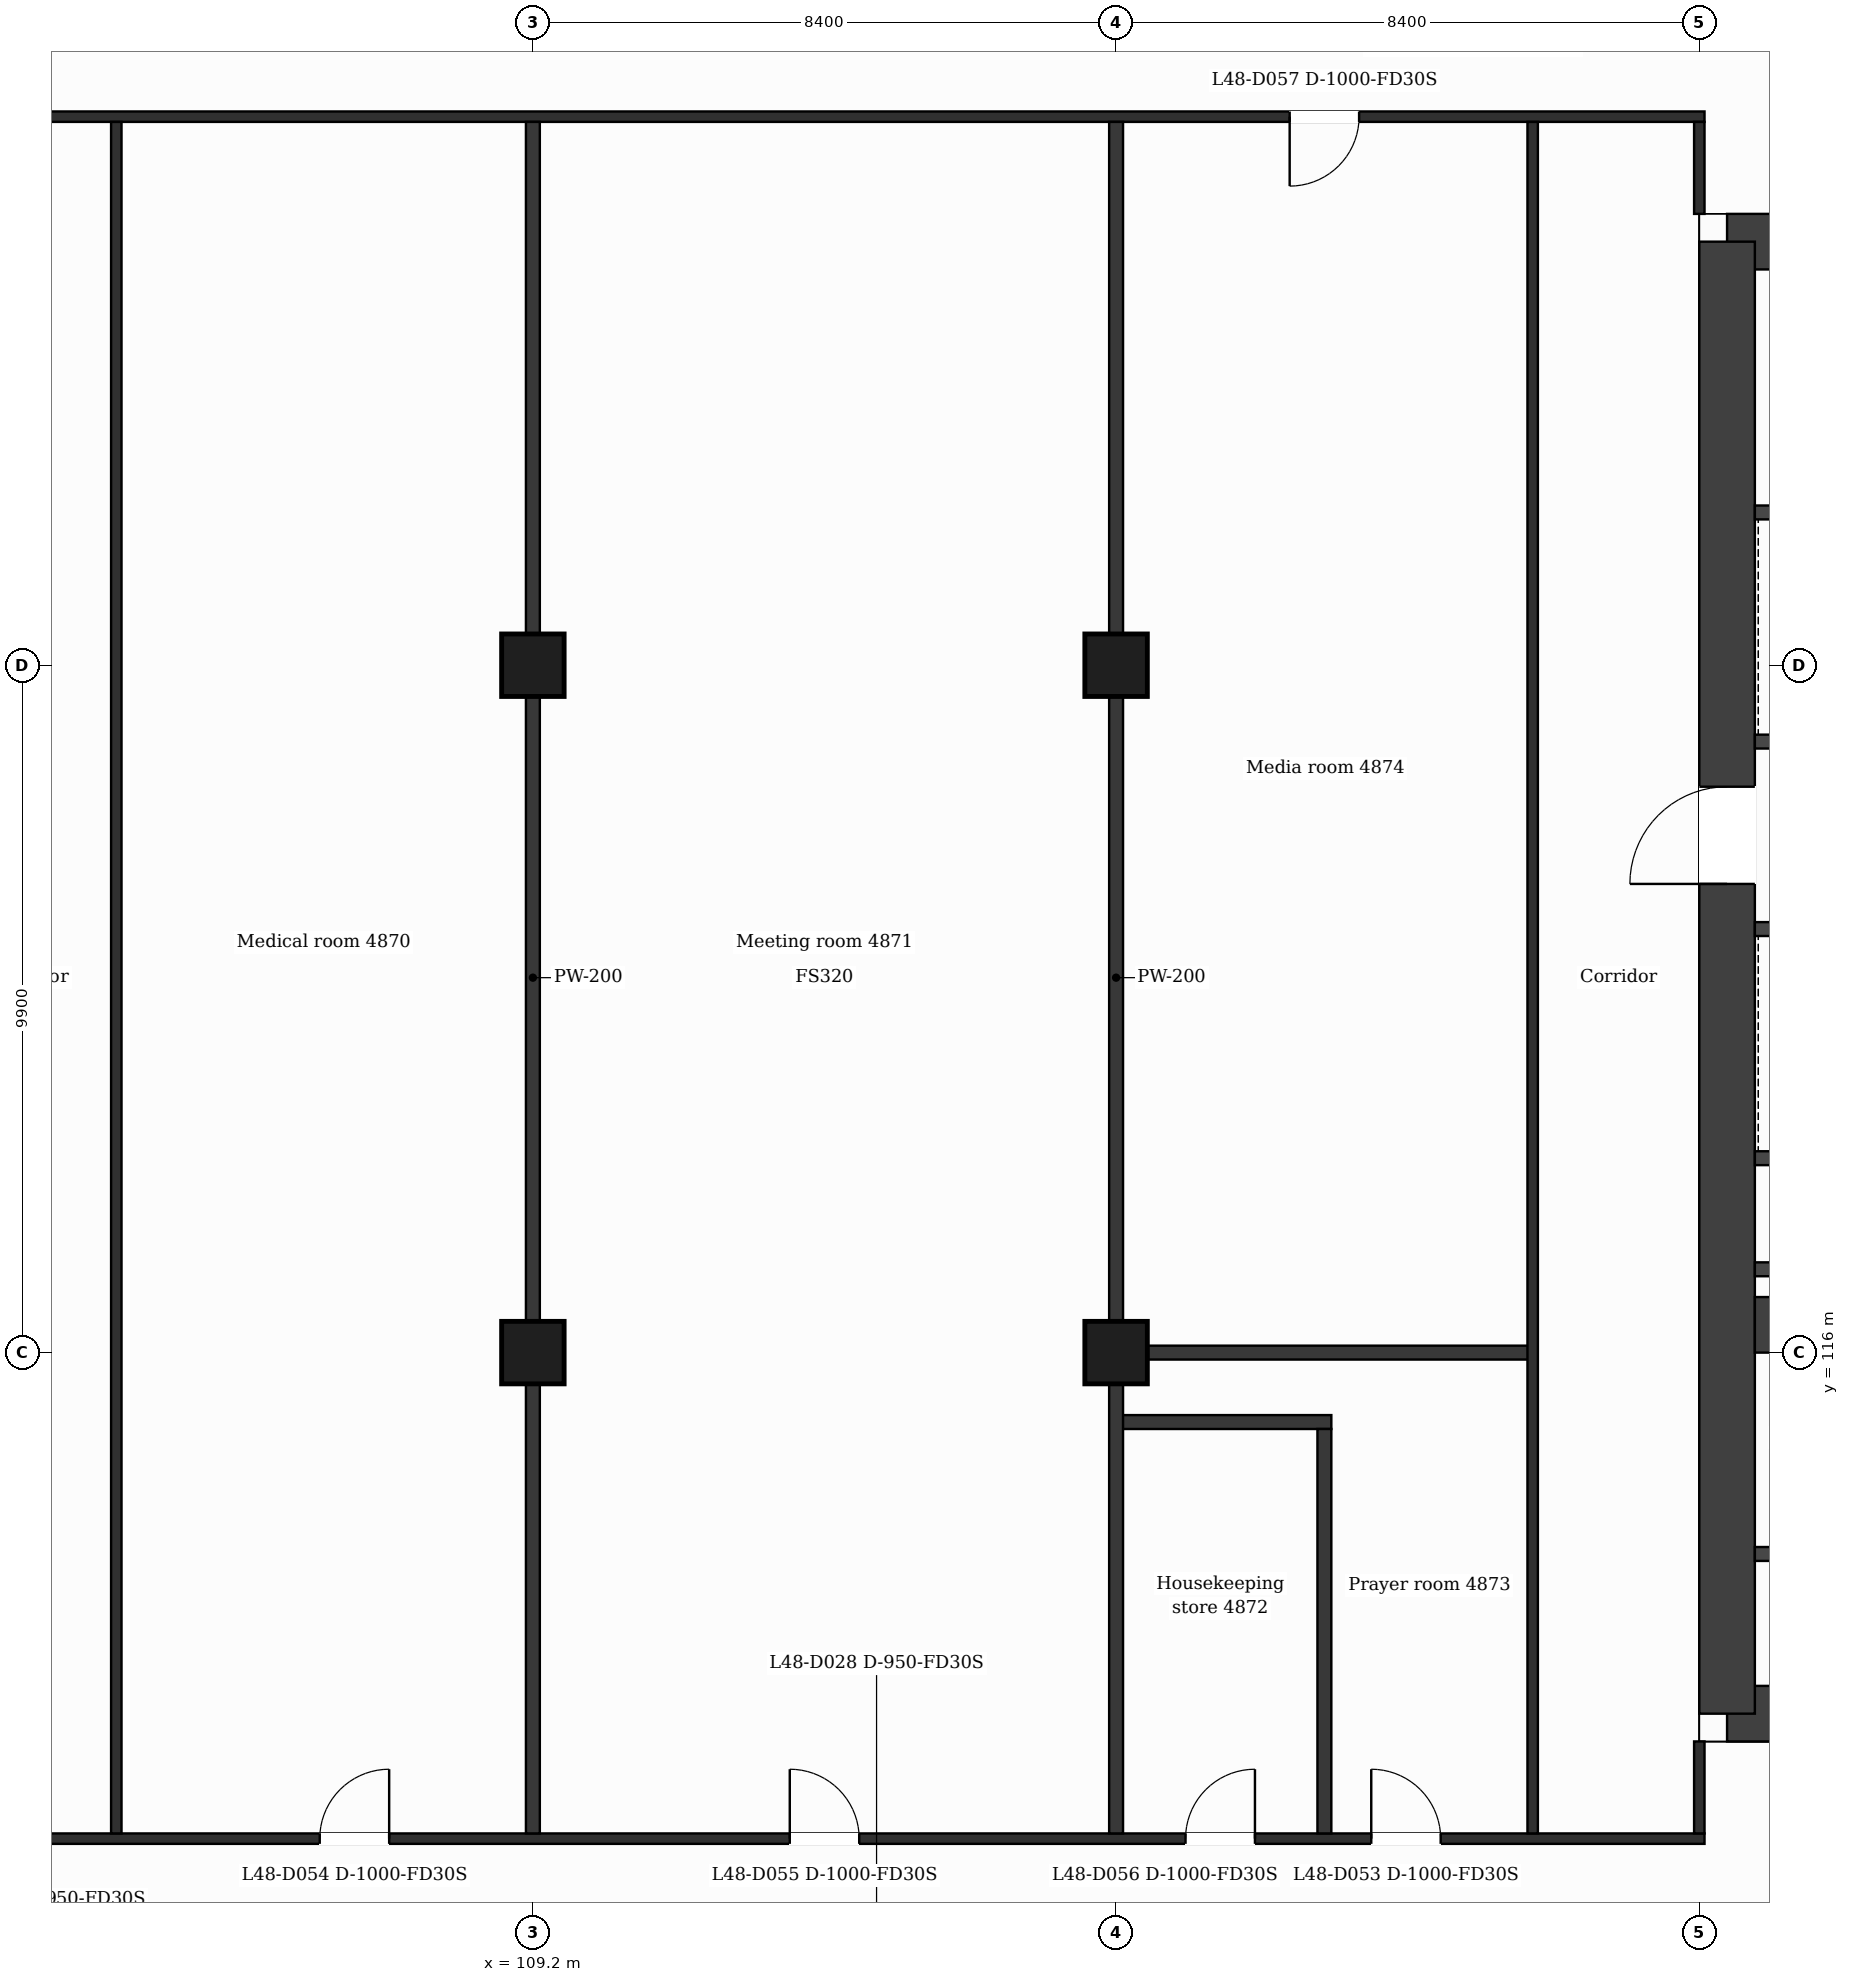
"""IFC4 building model, lengths in metres.
Left out: names, types, materials, properties, quantities, classifications, styles, units other than length and angle.
Written with IfcOpenShell. Run it as: python <this file> out.ifc"""

import sys

from ifc_helpers import new_model, si_unit, direction, frame, frame_2d, origin, origin_2d, place, context, subcontext, project, spatial, rectangle, extrude, element, fill, save


model = new_model("IFC4")
c1 = context("Model", 3, precision=1e-05, world=origin(), true_north=direction((0.0, 1.0)))
c2 = subcontext(c1, "Body", "Model", "MODEL_VIEW")
j1 = project(units=[si_unit("LENGTHUNIT", "METRE"), si_unit("PLANEANGLEUNIT", "RADIAN")], contexts=[c1])
p1 = place(None, origin())
s1 = spatial("IfcSite", under=j1, at=p1, CompositionType="ELEMENT")
p2 = place(p1, origin())
s2 = spatial("IfcBuilding", under=s1, at=p2, CompositionType="ELEMENT")
p3 = place(p2, frame((0.0, 0.0, 202.2)))
s3 = spatial("IfcBuildingStorey", under=s2, at=p3, CompositionType="ELEMENT", Elevation=202.2)
p4 = place(p3, frame((126.4, 132.0, 0.0), z_axis=(0.0, 0.0, 1.0), x_axis=(1.0, 0.0, 0.0)))
e1 = element("IfcWall", 1, at=p4, inside=s3, PredefinedType="SHEAR", context=c2, shape_type="SweptSolid", body=[
    extrude(rectangle(XDim=11.42, YDim=0.8, at=frame_2d((5.71, 0.0))), origin(), (0.0, 0.0, 1.0), 3.7),
])
p5 = place(p4, frame((3.386, 0.0, 0.0)))
e2 = element("IfcOpeningElement", 2, at=p5, cuts=e1, PredefinedType="OPENING", context=c2, shape_type="SweptSolid", body=[
    extrude(rectangle(XDim=1.2, YDim=2.1, at=frame_2d((0.6, 1.05))), frame((0.0, 0.41, 0.0), z_axis=(0.0, -1.0, 0.0), x_axis=(1.0, 0.0, 0.0)), (0.0, 0.0, 1.0), 0.82),
])
p6 = place(p3, frame((140.673, 110.8, 0.0), z_axis=(0.0, 0.0, 1.0), x_axis=(-1.0, 0.0, 0.0)))
e3 = element("IfcWall", 3, at=p6, inside=s3, PredefinedType="SHEAR", context=c2, shape_type="SweptSolid", body=[
    extrude(rectangle(XDim=14.273, YDim=0.8, at=frame_2d((7.137, 0.0))), origin(), (0.0, 0.0, 1.0), 3.7),
])
p7 = place(p6, frame((6.965, 0.0, 0.0)))
e4 = element("IfcOpeningElement", 4, at=p7, cuts=e3, PredefinedType="OPENING", context=c2, shape_type="SweptSolid", body=[
    extrude(rectangle(XDim=1.4, YDim=2.1, at=frame_2d((0.7, 1.05))), frame((0.0, 0.41, 0.0), z_axis=(0.0, -1.0, 0.0), x_axis=(1.0, 0.0, 0.0)), (0.0, 0.0, 1.0), 0.82),
])
p8 = place(p3, frame((126.4, 110.8, 0.0), z_axis=(0.0, 0.0, 1.0), x_axis=(0.0, 1.0, 0.0)))
e5 = element("IfcWall", 5, at=p8, inside=s3, PredefinedType="SHEAR", context=c2, shape_type="SweptSolid", body=[
    extrude(rectangle(XDim=21.2, YDim=0.8, at=frame_2d((10.6, 0.0))), origin(), (0.0, 0.0, 1.0), 3.7),
])
p9 = place(p8, frame((11.95, 0.0, 0.0)))
e6 = element("IfcOpeningElement", 6, at=p9, cuts=e5, PredefinedType="OPENING", context=c2, shape_type="SweptSolid", body=[
    extrude(rectangle(XDim=1.4, YDim=2.1, at=frame_2d((0.7, 1.05))), frame((0.0, 0.41, 0.0), z_axis=(0.0, -1.0, 0.0), x_axis=(1.0, 0.0, 0.0)), (0.0, 0.0, 1.0), 0.82),
])
p10 = place(p3, frame((126.8, 116.4, 0.0), z_axis=(0.0, 0.0, 1.0), x_axis=(1.0, 0.0, 0.0)))
e7 = element("IfcWall", 7, at=p10, inside=s3, PredefinedType="SHEAR", context=c2, shape_type="SweptSolid", body=[
    extrude(rectangle(XDim=5.3, YDim=0.8, at=frame_2d((2.65, 0.0))), origin(), (0.0, 0.0, 1.0), 3.7),
])
for number, where, z_axis, x_axis in (
    (8, (109.2, 116.0, 0.0), (0.0, 0.0, 1.0), (1.0, 0.0, 0.0)),
    (9, (117.6, 116.0, 0.0), (0.0, 0.0, 1.0), (1.0, 0.0, 0.0)),
    (10, (109.2, 125.9, 0.0), (0.0, 0.0, 1.0), (1.0, 0.0, 0.0)),
    (11, (117.6, 125.9, 0.0), (0.0, 0.0, 1.0), (1.0, 0.0, 0.0)),
):
    element("IfcColumn", number, at=place(p3, frame(where, z_axis=z_axis, x_axis=x_axis)), inside=s3, PredefinedType="COLUMN", context=c2, shape_type="SweptSolid", body=[
        extrude(rectangle(XDim=0.9, YDim=0.9, at=origin_2d()), origin(), (0.0, 0.0, 1.0), 3.7),
    ])
p11 = place(p3, frame((100.725, 109.0, 0.0), z_axis=(0.0, 0.0, 1.0), x_axis=(1.0, 0.0, 0.0)))
e12 = element("IfcWall", 12, at=p11, inside=s3, PredefinedType="PARTITIONING", context=c2, shape_type="SweptSolid", body=[
    extrude(rectangle(XDim=25.35, YDim=0.15, at=frame_2d((12.675, 0.0))), origin(), (0.0, 0.0, 1.0), 3.38),
])
p12 = place(p11, frame((20.55, 0.0, 0.0)))
e13 = element("IfcOpeningElement", 13, at=p12, cuts=e12, PredefinedType="OPENING", context=c2, shape_type="SweptSolid", body=[
    extrude(rectangle(XDim=1.0, YDim=2.1, at=frame_2d((0.5, 1.05))), frame((0.0, 0.085, 0.0), z_axis=(0.0, -1.0, 0.0), x_axis=(1.0, 0.0, 0.0)), (0.0, 0.0, 1.0), 0.17),
])
p13 = place(p11, frame((5.405, 0.0, 0.0)))
e14 = element("IfcOpeningElement", 14, at=p13, cuts=e12, PredefinedType="OPENING", context=c2, shape_type="SweptSolid", body=[
    extrude(rectangle(XDim=1.0, YDim=2.1, at=frame_2d((0.5, 1.05))), frame((0.0, 0.085, 0.0), z_axis=(0.0, -1.0, 0.0), x_axis=(1.0, 0.0, 0.0)), (0.0, 0.0, 1.0), 0.17),
])
p14 = place(p11, frame((12.175, 0.0, 0.0)))
e15 = element("IfcOpeningElement", 15, at=p14, cuts=e12, PredefinedType="OPENING", context=c2, shape_type="SweptSolid", body=[
    extrude(rectangle(XDim=1.0, YDim=2.1, at=frame_2d((0.5, 1.05))), frame((0.0, 0.085, 0.0), z_axis=(0.0, -1.0, 0.0), x_axis=(1.0, 0.0, 0.0)), (0.0, 0.0, 1.0), 0.17),
])
p15 = place(p11, frame((17.875, 0.0, 0.0)))
e16 = element("IfcOpeningElement", 16, at=p15, cuts=e12, PredefinedType="OPENING", context=c2, shape_type="SweptSolid", body=[
    extrude(rectangle(XDim=1.0, YDim=2.1, at=frame_2d((0.5, 1.05))), frame((0.0, 0.085, 0.0), z_axis=(0.0, -1.0, 0.0), x_axis=(1.0, 0.0, 0.0)), (0.0, 0.0, 1.0), 0.17),
])
p16 = place(p3, frame((126.8, 113.1, 0.0), z_axis=(0.0, 0.0, 1.0), x_axis=(1.0, 0.0, 0.0)))
e17 = element("IfcWall", 17, at=p16, inside=s3, PredefinedType="PARTITIONING", context=c2, shape_type="SweptSolid", body=[
    extrude(rectangle(XDim=4.873, YDim=0.2, at=frame_2d((2.437, 0.0))), origin(), (0.0, 0.0, 1.0), 3.38),
])
p17 = place(p16, frame((0.743, 0.0, 0.0)))
e18 = element("IfcOpeningElement", 18, at=p17, cuts=e17, PredefinedType="OPENING", context=c2, shape_type="SweptSolid", body=[
    extrude(rectangle(XDim=0.9, YDim=2.1, at=frame_2d((0.45, 1.05))), frame((0.0, 0.11, 0.0), z_axis=(0.0, -1.0, 0.0), x_axis=(1.0, 0.0, 0.0)), (0.0, 0.0, 1.0), 0.22),
])
p18 = place(p3, frame((117.6, 115.0, 0.0), z_axis=(0.0, 0.0, 1.0), x_axis=(1.0, 0.0, 0.0)))
e19 = element("IfcWall", 19, at=p18, inside=s3, PredefinedType="PARTITIONING", context=c2, shape_type="SweptSolid", body=[
    extrude(rectangle(XDim=3.1, YDim=0.2, at=frame_2d((1.55, 0.0))), origin(), (0.0, 0.0, 1.0), 3.38),
])
p19 = place(p3, frame((117.6, 116.0, 0.0), z_axis=(0.0, 0.0, 1.0), x_axis=(1.0, 0.0, 0.0)))
e20 = element("IfcWall", 20, at=p19, inside=s3, PredefinedType="PARTITIONING", context=c2, shape_type="SweptSolid", body=[
    extrude(rectangle(XDim=6.0, YDim=0.2, at=frame_2d((3.0, 0.0))), origin(), (0.0, 0.0, 1.0), 3.38),
])
for number, where, z_axis, x_axis in (
    (21, (126.8, 117.2, 0.0), (0.0, 0.0, 1.0), (1.0, 0.0, 0.0)),
    (22, (126.8, 118.8, 0.0), (0.0, 0.0, 1.0), (1.0, 0.0, 0.0)),
):
    element("IfcWall", number, at=place(p3, frame(where, z_axis=z_axis, x_axis=x_axis)), inside=s3, PredefinedType="PARTITIONING", context=c2, shape_type="SweptSolid", body=[
        extrude(rectangle(XDim=4.773, YDim=0.2, at=frame_2d((2.386, 0.0))), origin(), (0.0, 0.0, 1.0), 3.38),
    ])
p20 = place(p3, frame((126.8, 122.1, 0.0), z_axis=(0.0, 0.0, 1.0), x_axis=(1.0, 0.0, 0.0)))
e23 = element("IfcWall", 23, at=p20, inside=s3, PredefinedType="PARTITIONING", context=c2, shape_type="SweptSolid", body=[
    extrude(rectangle(XDim=4.773, YDim=0.2, at=frame_2d((2.386, 0.0))), origin(), (0.0, 0.0, 1.0), 3.38),
])
p21 = place(p20, frame((2.971, 0.0, 0.0)))
e24 = element("IfcOpeningElement", 24, at=p21, cuts=e23, PredefinedType="OPENING", context=c2, shape_type="SweptSolid", body=[
    extrude(rectangle(XDim=1.1, YDim=2.1, at=frame_2d((0.55, 1.05))), frame((0.0, 0.11, 0.0), z_axis=(0.0, -1.0, 0.0), x_axis=(1.0, 0.0, 0.0)), (0.0, 0.0, 1.0), 0.22),
])
p22 = place(p20, frame((0.643, 0.0, 0.0)))
e25 = element("IfcOpeningElement", 25, at=p22, cuts=e23, PredefinedType="OPENING", context=c2, shape_type="SweptSolid", body=[
    extrude(rectangle(XDim=1.1, YDim=2.1, at=frame_2d((0.55, 1.05))), frame((0.0, 0.11, 0.0), z_axis=(0.0, -1.0, 0.0), x_axis=(1.0, 0.0, 0.0)), (0.0, 0.0, 1.0), 0.22),
])
p23 = place(p3, frame((126.8, 124.8, 0.0), z_axis=(0.0, 0.0, 1.0), x_axis=(1.0, 0.0, 0.0)))
e26 = element("IfcWall", 26, at=p23, inside=s3, PredefinedType="PARTITIONING", context=c2, shape_type="SweptSolid", body=[
    extrude(rectangle(XDim=4.782, YDim=0.2, at=frame_2d((2.391, 0.0))), origin(), (0.0, 0.0, 1.0), 3.38),
])
p24 = place(p23, frame((0.705, 0.0, 0.0)))
e27 = element("IfcOpeningElement", 27, at=p24, cuts=e26, PredefinedType="OPENING", context=c2, shape_type="SweptSolid", body=[
    extrude(rectangle(XDim=1.1, YDim=2.1, at=frame_2d((0.55, 1.05))), frame((0.0, 0.11, 0.0), z_axis=(0.0, -1.0, 0.0), x_axis=(1.0, 0.0, 0.0)), (0.0, 0.0, 1.0), 0.22),
])
p25 = place(p3, frame((126.8, 128.1, 0.0), z_axis=(0.0, 0.0, 1.0), x_axis=(1.0, 0.0, 0.0)))
e28 = element("IfcWall", 28, at=p25, inside=s3, PredefinedType="PARTITIONING", context=c2, shape_type="SweptSolid", body=[
    extrude(rectangle(XDim=4.782, YDim=0.2, at=frame_2d((2.391, 0.0))), origin(), (0.0, 0.0, 1.0), 3.38),
])
p26 = place(p25, frame((3.096, 0.0, 0.0)))
e29 = element("IfcOpeningElement", 29, at=p26, cuts=e28, PredefinedType="OPENING", context=c2, shape_type="SweptSolid", body=[
    extrude(rectangle(XDim=1.1, YDim=2.1, at=frame_2d((0.55, 1.05))), frame((0.0, 0.11, 0.0), z_axis=(0.0, -1.0, 0.0), x_axis=(1.0, 0.0, 0.0)), (0.0, 0.0, 1.0), 0.22),
])
p27 = place(p3, frame((100.725, 133.8, 0.0), z_axis=(0.0, 0.0, 1.0), x_axis=(1.0, 0.0, 0.0)))
e30 = element("IfcWall", 30, at=p27, inside=s3, PredefinedType="PARTITIONING", context=c2, shape_type="SweptSolid", body=[
    extrude(rectangle(XDim=25.35, YDim=0.15, at=frame_2d((12.675, 0.0))), origin(), (0.0, 0.0, 1.0), 3.38),
])
p28 = place(p27, frame((19.375, 0.0, 0.0)))
e31 = element("IfcOpeningElement", 31, at=p28, cuts=e30, PredefinedType="OPENING", context=c2, shape_type="SweptSolid", body=[
    extrude(rectangle(XDim=1.0, YDim=2.1, at=frame_2d((0.5, 1.05))), frame((0.0, 0.085, 0.0), z_axis=(0.0, -1.0, 0.0), x_axis=(1.0, 0.0, 0.0)), (0.0, 0.0, 1.0), 0.17),
])
p29 = place(p3, frame((103.2, 109.075, 0.0), z_axis=(0.0, 0.0, 1.0), x_axis=(0.0, 1.0, 0.0)))
e32 = element("IfcWall", 32, at=p29, inside=s3, PredefinedType="PARTITIONING", context=c2, shape_type="SweptSolid", body=[
    extrude(rectangle(XDim=24.65, YDim=0.15, at=frame_2d((12.325, 0.0))), origin(), (0.0, 0.0, 1.0), 3.38),
])
for number, where, z_axis, x_axis in (
    (33, (109.2, 109.075, 0.0), (0.0, 0.0, 1.0), (0.0, 1.0, 0.0)),
    (34, (117.6, 109.075, 0.0), (0.0, 0.0, 1.0), (0.0, 1.0, 0.0)),
):
    element("IfcWall", number, at=place(p3, frame(where, z_axis=z_axis, x_axis=x_axis)), inside=s3, PredefinedType="PARTITIONING", context=c2, shape_type="SweptSolid", body=[
        extrude(rectangle(XDim=24.65, YDim=0.2, at=frame_2d((12.325, 0.0))), origin(), (0.0, 0.0, 1.0), 3.38),
    ])
p30 = place(p3, frame((120.6, 109.075, 0.0), z_axis=(0.0, 0.0, 1.0), x_axis=(0.0, 1.0, 0.0)))
e35 = element("IfcWall", 35, at=p30, inside=s3, PredefinedType="PARTITIONING", context=c2, shape_type="SweptSolid", body=[
    extrude(rectangle(XDim=5.825, YDim=0.2, at=frame_2d((2.913, 0.0))), origin(), (0.0, 0.0, 1.0), 3.38),
])
p31 = place(p3, frame((123.6, 109.075, 0.0), z_axis=(0.0, 0.0, 1.0), x_axis=(0.0, 1.0, 0.0)))
e36 = element("IfcWall", 36, at=p31, inside=s3, PredefinedType="PARTITIONING", context=c2, shape_type="SweptSolid", body=[
    extrude(rectangle(XDim=24.65, YDim=0.15, at=frame_2d((12.325, 0.0))), origin(), (0.0, 0.0, 1.0), 3.38),
])
p32 = place(p3, frame((126.0, 109.075, 0.0), z_axis=(0.0, 0.0, 1.0), x_axis=(0.0, 1.0, 0.0)))
e37 = element("IfcWall", 37, at=p32, inside=s3, PredefinedType="PARTITIONING", context=c2, shape_type="SweptSolid", body=[
    extrude(rectangle(XDim=1.325, YDim=0.15, at=frame_2d((0.663, 0.0))), origin(), (0.0, 0.0, 1.0), 3.38),
])
p33 = place(p3, frame((126.0, 132.4, 0.0), z_axis=(0.0, 0.0, 1.0), x_axis=(0.0, 1.0, 0.0)))
e38 = element("IfcWall", 38, at=p33, inside=s3, PredefinedType="PARTITIONING", context=c2, shape_type="SweptSolid", body=[
    extrude(rectangle(XDim=1.325, YDim=0.15, at=frame_2d((0.663, 0.0))), origin(), (0.0, 0.0, 1.0), 3.38),
])
p34 = place(p12, origin())
e39 = element("IfcDoor", 39, at=p34, inside=s3, OperationType="SINGLE_SWING_LEFT", PredefinedType="DOOR", context=c2, shape_type="SweptSolid", body=[
    extrude(rectangle(XDim=1.0, YDim=2.1, at=frame_2d((0.5, 1.05))), frame((0.0, 0.025, 0.0), z_axis=(0.0, -1.0, 0.0), x_axis=(1.0, 0.0, 0.0)), (0.0, 0.0, 1.0), 0.05),
])
fill(e13, e39)
p35 = place(p13, origin())
e40 = element("IfcDoor", 40, at=p35, inside=s3, OperationType="SINGLE_SWING_RIGHT", PredefinedType="DOOR", context=c2, shape_type="SweptSolid", body=[
    extrude(rectangle(XDim=1.0, YDim=2.1, at=frame_2d((0.5, 1.05))), frame((0.0, 0.025, 0.0), z_axis=(0.0, -1.0, 0.0), x_axis=(1.0, 0.0, 0.0)), (0.0, 0.0, 1.0), 0.05),
])
fill(e14, e40)
p36 = place(p14, origin())
e41 = element("IfcDoor", 41, at=p36, inside=s3, OperationType="SINGLE_SWING_LEFT", PredefinedType="DOOR", context=c2, shape_type="SweptSolid", body=[
    extrude(rectangle(XDim=1.0, YDim=2.1, at=frame_2d((0.5, 1.05))), frame((0.0, 0.025, 0.0), z_axis=(0.0, -1.0, 0.0), x_axis=(1.0, 0.0, 0.0)), (0.0, 0.0, 1.0), 0.05),
])
fill(e15, e41)
p37 = place(p15, origin())
e42 = element("IfcDoor", 42, at=p37, inside=s3, OperationType="SINGLE_SWING_RIGHT", PredefinedType="DOOR", context=c2, shape_type="SweptSolid", body=[
    extrude(rectangle(XDim=1.0, YDim=2.1, at=frame_2d((0.5, 1.05))), frame((0.0, 0.025, 0.0), z_axis=(0.0, -1.0, 0.0), x_axis=(1.0, 0.0, 0.0)), (0.0, 0.0, 1.0), 0.05),
])
fill(e16, e42)
p38 = place(p28, origin())
e43 = element("IfcDoor", 43, at=p38, inside=s3, OperationType="SINGLE_SWING_LEFT", PredefinedType="DOOR", context=c2, shape_type="SweptSolid", body=[
    extrude(rectangle(XDim=1.0, YDim=2.1, at=frame_2d((0.5, 1.05))), frame((0.0, 0.025, 0.0), z_axis=(0.0, -1.0, 0.0), x_axis=(1.0, 0.0, 0.0)), (0.0, 0.0, 1.0), 0.05),
])
fill(e31, e43)
p39 = place(p9, origin())
e44 = element("IfcDoor", 44, at=p39, inside=s3, OperationType="SINGLE_SWING_LEFT", PredefinedType="DOOR", context=c2, shape_type="SweptSolid", body=[
    extrude(rectangle(XDim=1.4, YDim=2.1, at=frame_2d((0.7, 1.05))), frame((0.0, 0.025, 0.0), z_axis=(0.0, -1.0, 0.0), x_axis=(1.0, 0.0, 0.0)), (0.0, 0.0, 1.0), 0.05),
])
fill(e6, e44)
save(model, sys.argv[1])
